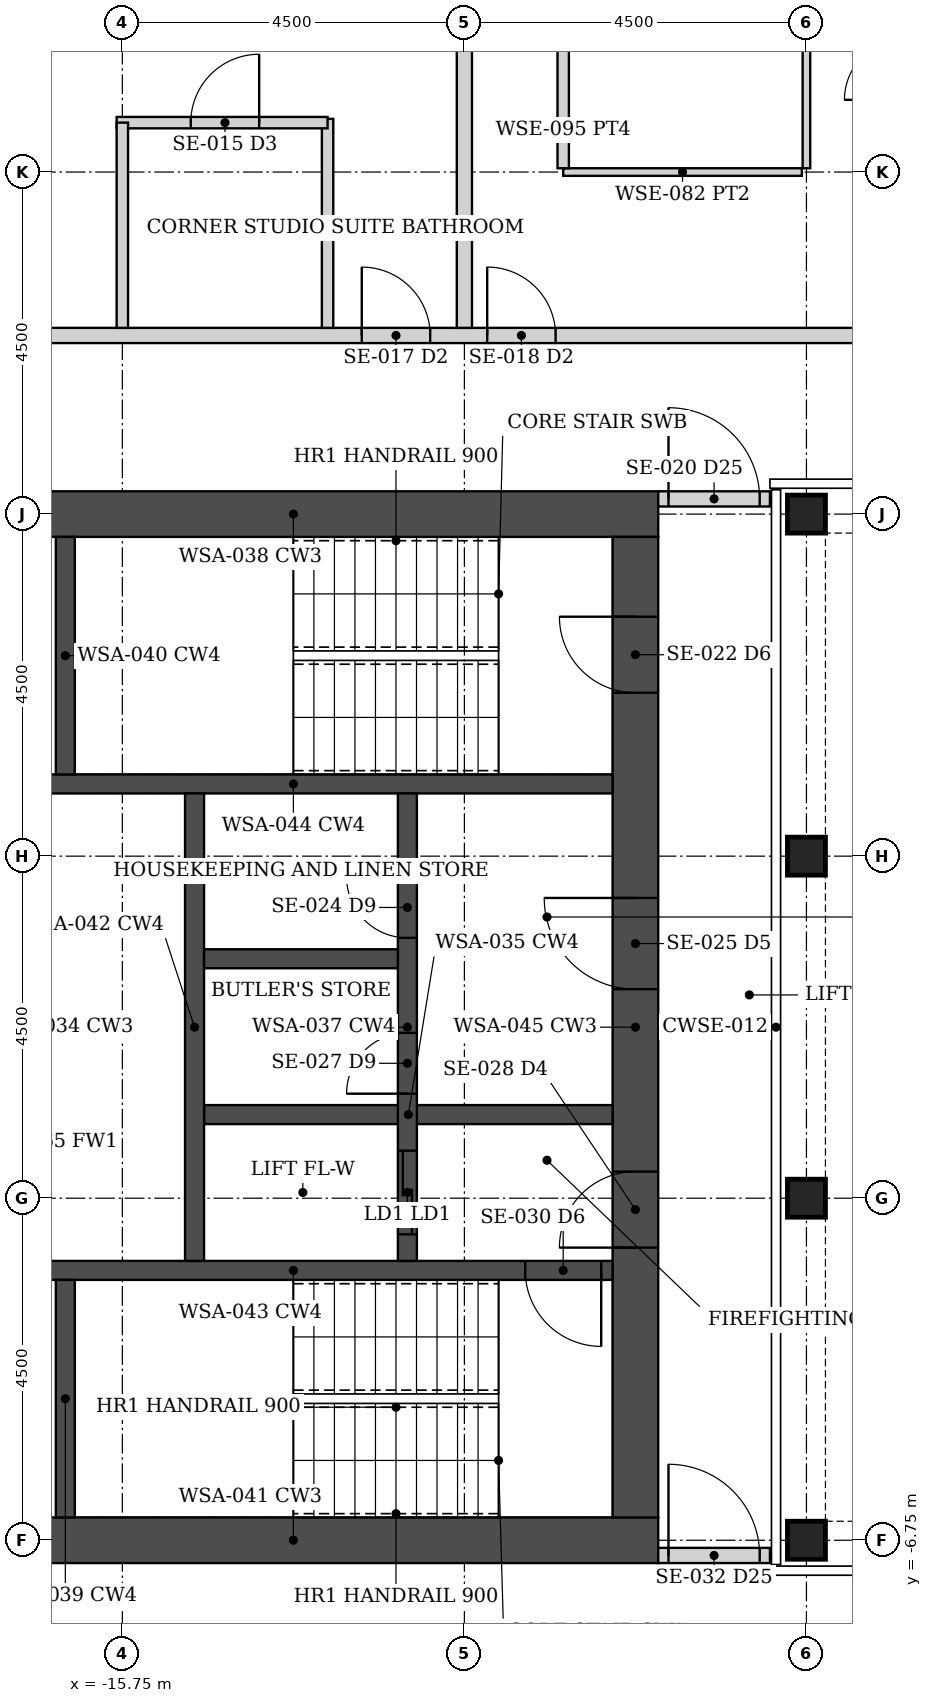
"""IFC4 building model, lengths in metres.
Left out: names, types, materials, properties, quantities, classifications, styles, units other than length and angle.
Written with IfcOpenShell. Run it as: python <this file> out.ifc"""

import sys

from ifc_helpers import new_model, si_unit, direction, frame, frame_2d, origin, origin_2d, place, context, subcontext, project, spatial, rectangle, hollow_rectangle, extrude, element, fill, save


model = new_model("IFC4")
c1 = context("Model", 3, precision=1e-05, world=origin(), true_north=direction((0.0, 1.0)))
c2 = subcontext(c1, "Body", "Model", "MODEL_VIEW")
j1 = project(units=[si_unit("LENGTHUNIT", "METRE"), si_unit("PLANEANGLEUNIT", "RADIAN")], contexts=[c1])
p1 = place(None, origin())
s1 = spatial("IfcSite", under=j1, at=p1, CompositionType="ELEMENT")
p2 = place(p1, origin())
s2 = spatial("IfcBuilding", under=s1, at=p2, CompositionType="ELEMENT")
p3 = place(p2, frame((0.0, 0.0, 253.3)))
s3 = spatial("IfcBuildingStorey", under=s2, at=p3, CompositionType="ELEMENT", Elevation=253.3)
for number, where, z_axis, x_axis in (
    (1, (-6.75, -6.75, 0.0), (0.0, 0.0, 1.0), (1.0, 0.0, 0.0)),
    (2, (-6.75, -2.25, 0.0), (0.0, 0.0, 1.0), (1.0, 0.0, 0.0)),
    (3, (-6.75, 2.25, 0.0), (0.0, 0.0, 1.0), (1.0, 0.0, 0.0)),
    (4, (-6.75, 6.75, 0.0), (0.0, 0.0, 1.0), (1.0, 0.0, 0.0)),
):
    element("IfcColumn", number, at=place(p3, frame(where, z_axis=z_axis, x_axis=x_axis)), inside=s3, PredefinedType="COLUMN", context=c2, shape_type="SweptSolid", body=[
        extrude(hollow_rectangle(XDim=0.5, YDim=0.5, WallThickness=0.025, at=origin_2d()), origin(), (0.0, 0.0, 1.0), 3.75),
    ])
for number, where, z_axis, x_axis in (
    (5, (-8.7, -6.75, 0.0), (0.0, 0.0, 1.0), (-1.0, 0.0, 0.0)),
    (6, (-8.7, 6.75, 0.0), (0.0, 0.0, 1.0), (-1.0, 0.0, 0.0)),
):
    element("IfcWall", number, at=place(p3, frame(where, z_axis=z_axis, x_axis=x_axis)), inside=s3, PredefinedType="SHEAR", context=c2, shape_type="SweptSolid", body=[
        extrude(rectangle(XDim=9.6, YDim=0.6, at=frame_2d((4.8, 0.0))), origin(), (0.0, 0.0, 1.0), 3.75),
    ])
p4 = place(p3, frame((-9.0, -6.45, 0.0), z_axis=(0.0, 0.0, 1.0), x_axis=(0.0, 1.0, 0.0)))
e7 = element("IfcWall", 7, at=p4, inside=s3, PredefinedType="SHEAR", context=c2, shape_type="SweptSolid", body=[
    extrude(rectangle(XDim=12.9, YDim=0.6, at=frame_2d((6.45, 0.0))), origin(), (0.0, 0.0, 1.0), 3.75),
])
p5 = place(p4, frame((3.55, 0.0, 0.0)))
e8 = element("IfcOpeningElement", 8, at=p5, cuts=e7, PredefinedType="OPENING", context=c2, shape_type="SweptSolid", body=[
    extrude(rectangle(XDim=1.0, YDim=2.1, at=frame_2d((0.5, 1.05))), frame((0.0, 0.31, 0.0), z_axis=(0.0, -1.0, 0.0), x_axis=(1.0, 0.0, 0.0)), (0.0, 0.0, 1.0), 0.62),
])
p6 = place(p4, frame((6.95, 0.0, 0.0)))
e9 = element("IfcOpeningElement", 9, at=p6, cuts=e7, PredefinedType="OPENING", context=c2, shape_type="SweptSolid", body=[
    extrude(rectangle(XDim=1.2, YDim=2.1, at=frame_2d((0.6, 1.05))), frame((0.0, 0.31, 0.0), z_axis=(0.0, -1.0, 0.0), x_axis=(1.0, 0.0, 0.0)), (0.0, 0.0, 1.0), 0.62),
])
p7 = place(p4, frame((10.85, 0.0, 0.0)))
e10 = element("IfcOpeningElement", 10, at=p7, cuts=e7, PredefinedType="OPENING", context=c2, shape_type="SweptSolid", body=[
    extrude(rectangle(XDim=1.0, YDim=2.1, at=frame_2d((0.5, 1.05))), frame((0.0, 0.31, 0.0), z_axis=(0.0, -1.0, 0.0), x_axis=(1.0, 0.0, 0.0)), (0.0, 0.0, 1.0), 0.62),
])
p8 = place(p3, frame((-9.3, -3.2, 0.0), z_axis=(0.0, 0.0, 1.0), x_axis=(-1.0, 0.0, 0.0)))
e11 = element("IfcWall", 11, at=p8, inside=s3, PredefinedType="SHEAR", context=c2, shape_type="SweptSolid", body=[
    extrude(rectangle(XDim=8.4, YDim=0.25, at=frame_2d((4.2, 0.0))), origin(), (0.0, 0.0, 1.0), 3.75),
])
p9 = place(p8, frame((0.15, 0.0, 0.0)))
e12 = element("IfcOpeningElement", 12, at=p9, cuts=e11, PredefinedType="OPENING", context=c2, shape_type="SweptSolid", body=[
    extrude(rectangle(XDim=1.0, YDim=2.1, at=frame_2d((0.5, 1.05))), frame((0.0, 0.135, 0.0), z_axis=(0.0, -1.0, 0.0), x_axis=(1.0, 0.0, 0.0)), (0.0, 0.0, 1.0), 0.27),
])
p10 = place(p3, frame((-9.3, 3.2, 0.0), z_axis=(0.0, 0.0, 1.0), x_axis=(-1.0, 0.0, 0.0)))
e13 = element("IfcWall", 13, at=p10, inside=s3, PredefinedType="SHEAR", context=c2, shape_type="SweptSolid", body=[
    extrude(rectangle(XDim=8.4, YDim=0.25, at=frame_2d((4.2, 0.0))), origin(), (0.0, 0.0, 1.0), 3.75),
])
for number, where, z_axis, x_axis in (
    (14, (-16.5, -6.45, 0.0), (0.0, 0.0, 1.0), (0.0, 1.0, 0.0)),
    (15, (-16.5, 3.325, 0.0), (0.0, 0.0, 1.0), (0.0, 1.0, 0.0)),
):
    element("IfcWall", number, at=place(p3, frame(where, z_axis=z_axis, x_axis=x_axis)), inside=s3, PredefinedType="SHEAR", context=c2, shape_type="SweptSolid", body=[
        extrude(rectangle(XDim=3.125, YDim=0.25, at=frame_2d((1.562, 0.0))), origin(), (0.0, 0.0, 1.0), 3.75),
    ])
p11 = place(p3, frame((-9.3, -1.15, 0.0), z_axis=(0.0, 0.0, 1.0), x_axis=(-1.0, 0.0, 0.0)))
e16 = element("IfcWall", 16, at=p11, inside=s3, PredefinedType="SHEAR", context=c2, shape_type="SweptSolid", body=[
    extrude(rectangle(XDim=5.375, YDim=0.25, at=frame_2d((2.688, 0.0))), origin(), (0.0, 0.0, 1.0), 3.75),
])
p12 = place(p3, frame((-12.0, -3.075, 0.0), z_axis=(0.0, 0.0, 1.0), x_axis=(0.0, 1.0, 0.0)))
e17 = element("IfcWall", 17, at=p12, inside=s3, PredefinedType="SHEAR", context=c2, shape_type="SweptSolid", body=[
    extrude(rectangle(XDim=6.15, YDim=0.25, at=frame_2d((3.075, 0.0))), origin(), (0.0, 0.0, 1.0), 3.75),
])
p13 = place(p12, frame((2.2, 0.0, 0.0)))
e18 = element("IfcOpeningElement", 18, at=p13, cuts=e17, PredefinedType="OPENING", context=c2, shape_type="SweptSolid", body=[
    extrude(rectangle(XDim=0.8, YDim=2.1, at=frame_2d((0.4, 1.05))), frame((0.0, 0.135, 0.0), z_axis=(0.0, -1.0, 0.0), x_axis=(1.0, 0.0, 0.0)), (0.0, 0.0, 1.0), 0.27),
])
p14 = place(p12, frame((4.25, 0.0, 0.0)))
e19 = element("IfcOpeningElement", 19, at=p14, cuts=e17, PredefinedType="OPENING", context=c2, shape_type="SweptSolid", body=[
    extrude(rectangle(XDim=0.8, YDim=2.1, at=frame_2d((0.4, 1.05))), frame((0.0, 0.135, 0.0), z_axis=(0.0, -1.0, 0.0), x_axis=(1.0, 0.0, 0.0)), (0.0, 0.0, 1.0), 0.27),
])
p15 = place(p12, frame((0.35, 0.0, 0.0)))
e20 = element("IfcOpeningElement", 20, at=p15, cuts=e17, PredefinedType="OPENING", context=c2, shape_type="SweptSolid", body=[
    extrude(rectangle(XDim=1.1, YDim=2.1, at=frame_2d((0.55, 1.05))), frame((0.0, 0.135, 0.0), z_axis=(0.0, -1.0, 0.0), x_axis=(1.0, 0.0, 0.0)), (0.0, 0.0, 1.0), 0.27),
])
p16 = place(p3, frame((-14.8, -3.075, 0.0), z_axis=(0.0, 0.0, 1.0), x_axis=(0.0, 1.0, 0.0)))
e21 = element("IfcWall", 21, at=p16, inside=s3, PredefinedType="SHEAR", context=c2, shape_type="SweptSolid", body=[
    extrude(rectangle(XDim=6.15, YDim=0.25, at=frame_2d((3.075, 0.0))), origin(), (0.0, 0.0, 1.0), 3.75),
])
p17 = place(p3, frame((-12.125, 0.9, 0.0), z_axis=(0.0, 0.0, 1.0), x_axis=(-1.0, 0.0, 0.0)))
e22 = element("IfcWall", 22, at=p17, inside=s3, PredefinedType="SHEAR", context=c2, shape_type="SweptSolid", body=[
    extrude(rectangle(XDim=2.55, YDim=0.25, at=frame_2d((1.275, 0.0))), origin(), (0.0, 0.0, 1.0), 3.75),
])
p18 = place(p3, frame((-8.7, 6.95, 0.0), z_axis=(0.0, 0.0, 1.0), x_axis=(1.0, 0.0, 0.0)))
e23 = element("IfcWall", 23, at=p18, inside=s3, PredefinedType="PARTITIONING", context=c2, shape_type="SweptSolid", body=[
    extrude(rectangle(XDim=1.47, YDim=0.2, at=frame_2d((0.735, 0.0))), origin(), (0.0, 0.0, 1.0), 2.573),
])
p19 = place(p18, frame((0.135, 0.0, 0.0)))
e24 = element("IfcOpeningElement", 24, at=p19, cuts=e23, PredefinedType="OPENING", context=c2, shape_type="SweptSolid", body=[
    extrude(rectangle(XDim=1.2, YDim=2.1, at=frame_2d((0.6, 1.05))), frame((0.0, 0.11, 0.0), z_axis=(0.0, -1.0, 0.0), x_axis=(1.0, 0.0, 0.0)), (0.0, 0.0, 1.0), 0.22),
])
p20 = place(p3, frame((-8.7, -6.95, 0.0), z_axis=(0.0, 0.0, 1.0), x_axis=(1.0, 0.0, 0.0)))
e25 = element("IfcWall", 25, at=p20, inside=s3, PredefinedType="PARTITIONING", context=c2, shape_type="SweptSolid", body=[
    extrude(rectangle(XDim=1.47, YDim=0.2, at=frame_2d((0.735, 0.0))), origin(), (0.0, 0.0, 1.0), 2.573),
])
p21 = place(p20, frame((0.135, 0.0, 0.0)))
e26 = element("IfcOpeningElement", 26, at=p21, cuts=e25, PredefinedType="OPENING", context=c2, shape_type="SweptSolid", body=[
    extrude(rectangle(XDim=1.2, YDim=2.1, at=frame_2d((0.6, 1.05))), frame((0.0, 0.11, 0.0), z_axis=(0.0, -1.0, 0.0), x_axis=(1.0, 0.0, 0.0)), (0.0, 0.0, 1.0), 0.22),
])
p22 = place(p3, frame((-20.05, 9.1, 0.0), z_axis=(0.0, 0.0, 1.0), x_axis=(1.0, 0.0, 0.0)))
e27 = element("IfcWall", 27, at=p22, inside=s3, PredefinedType="PARTITIONING", context=c2, shape_type="SweptSolid", body=[
    extrude(rectangle(XDim=40.1, YDim=0.2, at=frame_2d((20.05, 0.0))), origin(), (0.0, 0.0, 1.0), 2.573),
])
p23 = place(p22, frame((9.1, 0.0, 0.0)))
e28 = element("IfcOpeningElement", 28, at=p23, cuts=e27, PredefinedType="OPENING", context=c2, shape_type="SweptSolid", body=[
    extrude(rectangle(XDim=0.9, YDim=2.1, at=frame_2d((0.45, 1.05))), frame((0.0, 0.11, 0.0), z_axis=(0.0, -1.0, 0.0), x_axis=(1.0, 0.0, 0.0)), (0.0, 0.0, 1.0), 0.22),
])
p24 = place(p22, frame((31.75, 0.0, 0.0)))
e29 = element("IfcOpeningElement", 29, at=p24, cuts=e27, PredefinedType="OPENING", context=c2, shape_type="SweptSolid", body=[
    extrude(rectangle(XDim=0.9, YDim=2.1, at=frame_2d((0.45, 1.05))), frame((0.0, 0.11, 0.0), z_axis=(0.0, -1.0, 0.0), x_axis=(1.0, 0.0, 0.0)), (0.0, 0.0, 1.0), 0.22),
])
p25 = place(p22, frame((7.45, 0.0, 0.0)))
e30 = element("IfcOpeningElement", 30, at=p25, cuts=e27, PredefinedType="OPENING", context=c2, shape_type="SweptSolid", body=[
    extrude(rectangle(XDim=0.9, YDim=2.1, at=frame_2d((0.45, 1.05))), frame((0.0, 0.11, 0.0), z_axis=(0.0, -1.0, 0.0), x_axis=(1.0, 0.0, 0.0)), (0.0, 0.0, 1.0), 0.22),
])
p26 = place(p3, frame((-9.95, 11.25, 0.0), z_axis=(0.0, 0.0, 1.0), x_axis=(1.0, 0.0, 0.0)))
e31 = element("IfcWall", 31, at=p26, inside=s3, PredefinedType="PARTITIONING", context=c2, shape_type="SweptSolid", body=[
    extrude(rectangle(XDim=3.14, YDim=0.1, at=frame_2d((1.57, 0.0))), origin(), (0.0, 0.0, 1.0), 2.573),
])
p27 = place(p3, frame((-9.95, 11.3, 0.0), z_axis=(0.0, 0.0, 1.0), x_axis=(0.0, 1.0, 0.0)))
e32 = element("IfcWall", 32, at=p27, inside=s3, PredefinedType="PARTITIONING", context=c2, shape_type="SweptSolid", body=[
    extrude(rectangle(XDim=5.0, YDim=0.15, at=frame_2d((2.5, 0.0))), origin(), (0.0, 0.0, 1.0), 2.573),
])
p28 = place(p27, frame((2.05, 0.0, 0.0)))
e33 = element("IfcOpeningElement", 33, at=p28, cuts=e32, PredefinedType="OPENING", context=c2, shape_type="SweptSolid", body=[
    extrude(rectangle(XDim=0.9, YDim=2.1, at=frame_2d((0.45, 1.05))), frame((0.0, 0.085, 0.0), z_axis=(0.0, -1.0, 0.0), x_axis=(1.0, 0.0, 0.0)), (0.0, 0.0, 1.0), 0.17),
])
p29 = place(p3, frame((-6.75, 11.3, 0.0), z_axis=(0.0, 0.0, 1.0), x_axis=(0.0, 1.0, 0.0)))
e34 = element("IfcWall", 34, at=p29, inside=s3, PredefinedType="PARTITIONING", context=c2, shape_type="SweptSolid", body=[
    extrude(rectangle(XDim=8.6, YDim=0.1, at=frame_2d((4.3, 0.0))), origin(), (0.0, 0.0, 1.0), 2.573),
])
p30 = place(p3, frame((-11.25, 9.2, 0.0), z_axis=(0.0, 0.0, 1.0), x_axis=(0.0, 1.0, 0.0)))
e35 = element("IfcWall", 35, at=p30, inside=s3, PredefinedType="PARTITIONING", context=c2, shape_type="SweptSolid", body=[
    extrude(rectangle(XDim=10.7, YDim=0.2, at=frame_2d((5.35, 0.0))), origin(), (0.0, 0.0, 1.0), 2.573),
])
p31 = place(p3, frame((-13.05, 9.2, 0.0), z_axis=(0.0, 0.0, 1.0), x_axis=(0.0, 1.0, 0.0)))
e36 = element("IfcWall", 36, at=p31, inside=s3, PredefinedType="PARTITIONING", context=c2, shape_type="SweptSolid", body=[
    extrude(rectangle(XDim=2.75, YDim=0.15, at=frame_2d((1.375, 0.0))), origin(), (0.0, 0.0, 1.0), 2.573),
])
p32 = place(p3, frame((-15.825, 11.9, 0.0), z_axis=(0.0, 0.0, 1.0), x_axis=(1.0, 0.0, 0.0)))
e37 = element("IfcWall", 37, at=p32, inside=s3, PredefinedType="PARTITIONING", context=c2, shape_type="SweptSolid", body=[
    extrude(rectangle(XDim=2.775, YDim=0.15, at=frame_2d((1.387, 0.0))), origin(), (0.0, 0.0, 1.0), 2.573),
])
p33 = place(p32, frame((0.975, 0.0, 0.0)))
e38 = element("IfcOpeningElement", 38, at=p33, cuts=e37, PredefinedType="OPENING", context=c2, shape_type="SweptSolid", body=[
    extrude(rectangle(XDim=0.9, YDim=2.1, at=frame_2d((0.45, 1.05))), frame((0.0, 0.085, 0.0), z_axis=(0.0, -1.0, 0.0), x_axis=(1.0, 0.0, 0.0)), (0.0, 0.0, 1.0), 0.17),
])
p34 = place(p3, frame((-15.75, 9.2, 0.0), z_axis=(0.0, 0.0, 1.0), x_axis=(0.0, 1.0, 0.0)))
e39 = element("IfcWall", 39, at=p34, inside=s3, PredefinedType="PARTITIONING", context=c2, shape_type="SweptSolid", body=[
    extrude(rectangle(XDim=2.7, YDim=0.15, at=frame_2d((1.35, 0.0))), origin(), (0.0, 0.0, 1.0), 2.573),
])
p35 = place(p19, origin())
e40 = element("IfcDoor", 40, at=p35, inside=s3, OperationType="DOUBLE_DOOR_DOUBLE_SWING", PredefinedType="DOOR", context=c2, shape_type="SweptSolid", body=[
    extrude(rectangle(XDim=1.2, YDim=2.1, at=frame_2d((0.6, 1.05))), frame((0.0, 0.025, 0.0), z_axis=(0.0, -1.0, 0.0), x_axis=(1.0, 0.0, 0.0)), (0.0, 0.0, 1.0), 0.05),
])
fill(e24, e40)
p36 = place(p21, origin())
e41 = element("IfcDoor", 41, at=p36, inside=s3, OperationType="DOUBLE_DOOR_DOUBLE_SWING", PredefinedType="DOOR", context=c2, shape_type="SweptSolid", body=[
    extrude(rectangle(XDim=1.2, YDim=2.1, at=frame_2d((0.6, 1.05))), frame((0.0, 0.025, 0.0), z_axis=(0.0, -1.0, 0.0), x_axis=(1.0, 0.0, 0.0)), (0.0, 0.0, 1.0), 0.05),
])
fill(e26, e41)
p37 = place(p23, origin())
e42 = element("IfcDoor", 42, at=p37, inside=s3, OperationType="SINGLE_SWING_LEFT", PredefinedType="DOOR", context=c2, shape_type="SweptSolid", body=[
    extrude(rectangle(XDim=0.9, YDim=2.1, at=frame_2d((0.45, 1.05))), frame((0.0, 0.025, 0.0), z_axis=(0.0, -1.0, 0.0), x_axis=(1.0, 0.0, 0.0)), (0.0, 0.0, 1.0), 0.05),
])
fill(e28, e42)
p38 = place(p25, origin())
e43 = element("IfcDoor", 43, at=p38, inside=s3, OperationType="SINGLE_SWING_LEFT", PredefinedType="DOOR", context=c2, shape_type="SweptSolid", body=[
    extrude(rectangle(XDim=0.9, YDim=2.1, at=frame_2d((0.45, 1.05))), frame((0.0, 0.025, 0.0), z_axis=(0.0, -1.0, 0.0), x_axis=(1.0, 0.0, 0.0)), (0.0, 0.0, 1.0), 0.05),
])
fill(e30, e43)
p39 = place(p33, origin())
e44 = element("IfcDoor", 44, at=p39, inside=s3, OperationType="SINGLE_SWING_RIGHT", PredefinedType="DOOR", context=c2, shape_type="SweptSolid", body=[
    extrude(rectangle(XDim=0.9, YDim=2.1, at=frame_2d((0.45, 1.05))), frame((0.0, 0.025, 0.0), z_axis=(0.0, -1.0, 0.0), x_axis=(1.0, 0.0, 0.0)), (0.0, 0.0, 1.0), 0.05),
])
fill(e38, e44)
p40 = place(p5, origin())
e45 = element("IfcDoor", 45, at=p40, inside=s3, OperationType="SINGLE_SWING_LEFT", PredefinedType="DOOR", context=c2, shape_type="SweptSolid", body=[
    extrude(rectangle(XDim=1.0, YDim=2.1, at=frame_2d((0.5, 1.05))), frame((0.0, 0.025, 0.0), z_axis=(0.0, -1.0, 0.0), x_axis=(1.0, 0.0, 0.0)), (0.0, 0.0, 1.0), 0.05),
])
fill(e8, e45)
p41 = place(p9, origin())
e46 = element("IfcDoor", 46, at=p41, inside=s3, OperationType="SINGLE_SWING_LEFT", PredefinedType="DOOR", context=c2, shape_type="SweptSolid", body=[
    extrude(rectangle(XDim=1.0, YDim=2.1, at=frame_2d((0.5, 1.05))), frame((0.0, 0.025, 0.0), z_axis=(0.0, -1.0, 0.0), x_axis=(1.0, 0.0, 0.0)), (0.0, 0.0, 1.0), 0.05),
])
fill(e12, e46)
p42 = place(p6, origin())
e47 = element("IfcDoor", 47, at=p42, inside=s3, OperationType="SINGLE_SWING_RIGHT", PredefinedType="DOOR", context=c2, shape_type="SweptSolid", body=[
    extrude(rectangle(XDim=1.2, YDim=2.1, at=frame_2d((0.6, 1.05))), frame((0.0, 0.025, 0.0), z_axis=(0.0, -1.0, 0.0), x_axis=(1.0, 0.0, 0.0)), (0.0, 0.0, 1.0), 0.05),
])
fill(e9, e47)
p43 = place(p13, origin())
e48 = element("IfcDoor", 48, at=p43, inside=s3, OperationType="SINGLE_SWING_LEFT", PredefinedType="DOOR", context=c2, shape_type="SweptSolid", body=[
    extrude(rectangle(XDim=0.8, YDim=2.1, at=frame_2d((0.4, 1.05))), frame((0.0, 0.025, 0.0), z_axis=(0.0, -1.0, 0.0), x_axis=(1.0, 0.0, 0.0)), (0.0, 0.0, 1.0), 0.05),
])
fill(e18, e48)
p44 = place(p14, origin())
e49 = element("IfcDoor", 49, at=p44, inside=s3, OperationType="SINGLE_SWING_RIGHT", PredefinedType="DOOR", context=c2, shape_type="SweptSolid", body=[
    extrude(rectangle(XDim=0.8, YDim=2.1, at=frame_2d((0.4, 1.05))), frame((0.0, 0.025, 0.0), z_axis=(0.0, -1.0, 0.0), x_axis=(1.0, 0.0, 0.0)), (0.0, 0.0, 1.0), 0.05),
])
fill(e19, e49)
p45 = place(p7, origin())
e50 = element("IfcDoor", 50, at=p45, inside=s3, OperationType="SINGLE_SWING_RIGHT", PredefinedType="DOOR", context=c2, shape_type="SweptSolid", body=[
    extrude(rectangle(XDim=1.0, YDim=2.1, at=frame_2d((0.5, 1.05))), frame((0.0, 0.025, 0.0), z_axis=(0.0, -1.0, 0.0), x_axis=(1.0, 0.0, 0.0)), (0.0, 0.0, 1.0), 0.05),
])
fill(e10, e50)
p46 = place(p15, origin())
e51 = element("IfcDoor", 51, at=p46, inside=s3, OperationType="DOUBLE_DOOR_SLIDING", PredefinedType="DOOR", context=c2, shape_type="SweptSolid", body=[
    extrude(rectangle(XDim=1.1, YDim=2.1, at=frame_2d((0.55, 1.05))), frame((0.0, 0.025, 0.0), z_axis=(0.0, -1.0, 0.0), x_axis=(1.0, 0.0, 0.0)), (0.0, 0.0, 1.0), 0.05),
])
fill(e20, e51)
save(model, sys.argv[1])
